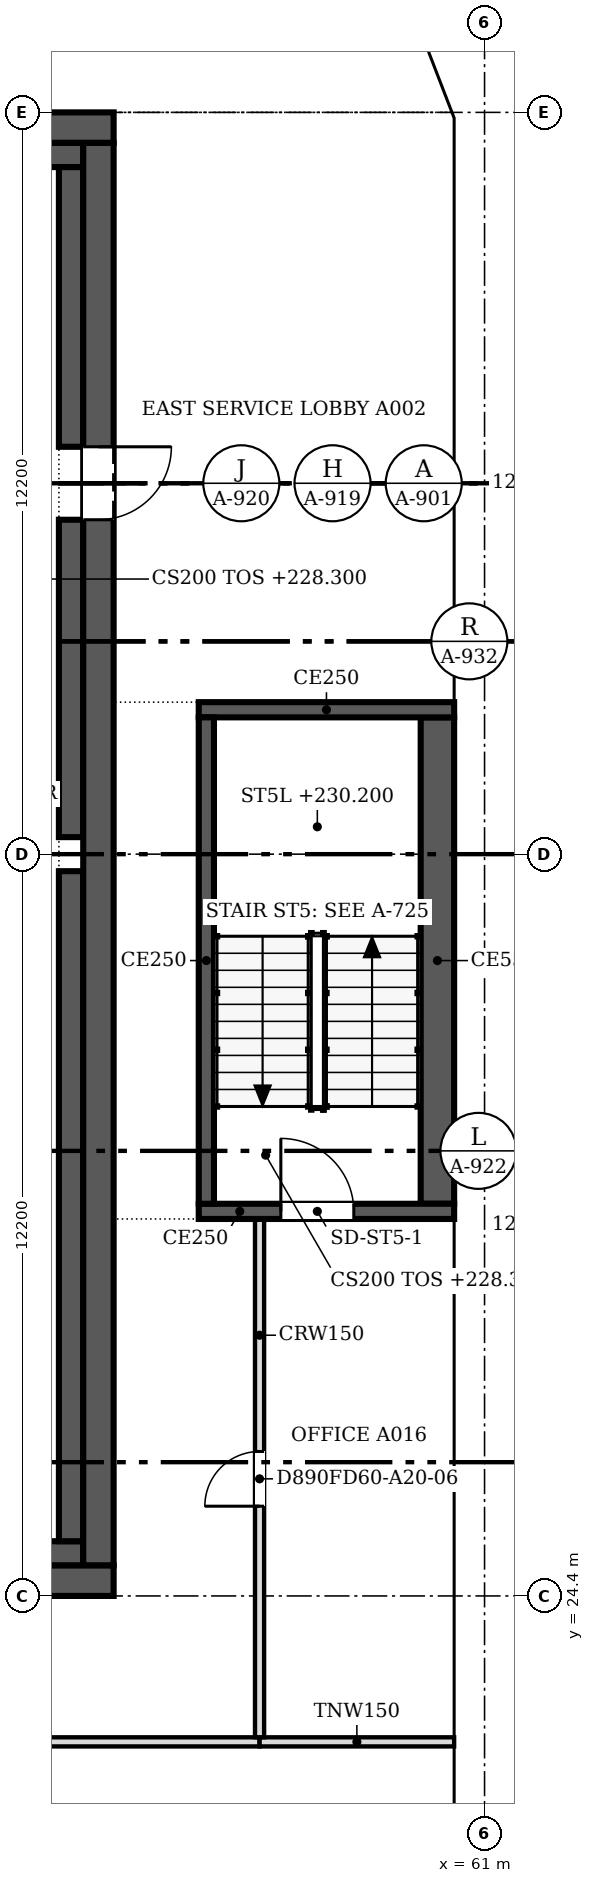
"""IFC4 building model, lengths in metres.
Left out: names, types, materials, properties, quantities, classifications, styles, units other than length and angle.
Written with IfcOpenShell. Run it as: python <this file> out.ifc"""

import sys

from ifc_helpers import new_model, si_unit, direction, frame, frame_2d, origin, place, context, subcontext, project, spatial, polyline, rectangle, outline, extrude, faceted_brep, source, transform, mapped, element, fill, save


model = new_model("IFC4")
c1 = context("Model", 3, precision=1e-05, world=origin(), true_north=direction((0.0, 1.0)))
c2 = subcontext(c1, "Body", "Model", "MODEL_VIEW")
j1 = project(units=[si_unit("LENGTHUNIT", "METRE"), si_unit("PLANEANGLEUNIT", "RADIAN")], contexts=[c1])
p1 = place(None, origin())
s1 = spatial("IfcSite", under=j1, at=p1, CompositionType="ELEMENT")
p2 = place(p1, origin())
s2 = spatial("IfcBuilding", under=s1, at=p2, CompositionType="ELEMENT")
p3 = place(p2, frame((0.0, 0.0, 228.3)))
s3 = spatial("IfcBuildingStorey", under=s2, at=p3, CompositionType="ELEMENT", Elevation=228.3)
m1 = source(origin(), c2, "Body", "Brep", [
    faceted_brep([(3.05, -0.25, 0.0), (6.1, -0.25, 3.8), (6.1, -0.25, 3.8), (3.05, -0.25, 7.6), (0.0, -0.25, 3.8), (0.0, 0.25, 3.8), (3.05, 0.25, 7.6), (6.1, 0.25, 3.8), (6.1, 0.25, 3.8), (3.05, 0.25, 0.0)], [[[0, 1, 2, 3, 4]], [[5, 6, 7, 8, 9]], [[9, 8, 1, 0]], [[7, 6, 3, 2]], [[6, 5, 4, 3]], [[5, 9, 0, 4]], [[1, 8, 7, 2]]]),
])
p4 = place(p3, frame((60.75, 18.3, -3.8), z_axis=(0.0, 0.0, 1.0), x_axis=(0.0, 1.0, 0.0)))
e1 = element("IfcWall", 1, at=p4, inside=s3, PredefinedType="SOLIDWALL", context=c2, shape_type="MappedRepresentation", body=[
    mapped(m1, transform((0.0, 0.0, 0.0), scale=1.0)),
])
m2 = source(origin(), c2, "Body", "SweptSolid", [
    extrude(outline(polyline([(3.05, 0.399), (5.78, 3.8), (3.05, 7.201), (0.321, 3.8), (3.05, 0.399)])), frame((0.0, 0.26, 0.0), z_axis=(0.0, -1.0, 0.0), x_axis=(1.0, 0.0, 0.0)), (0.0, 0.0, 1.0), 0.52),
])
p5 = place(p4, origin())
e2 = element("IfcOpeningElement", 2, at=p5, cuts=e1, PredefinedType="OPENING", context=c2, shape_type="MappedRepresentation", body=[
    mapped(m2, transform((0.0, 0.0, 0.0), scale=1.0)),
])
m3 = source(origin(), c2, "Body", "SweptSolid", [
    extrude(outline(polyline([(3.05, 0.0), (6.1, 3.8), (3.05, 7.6), (0.0, 3.8), (3.05, 0.0)])), frame((0.0, 0.25, 0.0), z_axis=(0.0, -1.0, 0.0), x_axis=(1.0, 0.0, 0.0)), (0.0, 0.0, 1.0), 0.5),
])
p6 = place(p3, frame((60.75, 24.4, -3.8), z_axis=(0.0, 0.0, 1.0), x_axis=(0.0, 1.0, 0.0)))
e3 = element("IfcWall", 3, at=p6, inside=s3, PredefinedType="SOLIDWALL", context=c2, shape_type="MappedRepresentation", body=[
    mapped(m3, transform((0.0, 0.0, 0.0), scale=1.0)),
])
p7 = place(p6, origin())
e4 = element("IfcOpeningElement", 4, at=p7, cuts=e3, PredefinedType="OPENING", context=c2, shape_type="MappedRepresentation", body=[
    mapped(m2, transform((0.0, 0.0, 0.0), scale=1.0)),
])
p8 = place(p3, frame((60.75, 30.5, -3.8), z_axis=(0.0, 0.0, 1.0), x_axis=(0.0, 1.0, 0.0)))
e5 = element("IfcWall", 5, at=p8, inside=s3, PredefinedType="SOLIDWALL", context=c2, shape_type="MappedRepresentation", body=[
    mapped(m3, transform((0.0, 0.0, 0.0), scale=1.0)),
])
p9 = place(p8, origin())
e6 = element("IfcOpeningElement", 6, at=p9, cuts=e5, PredefinedType="OPENING", context=c2, shape_type="MappedRepresentation", body=[
    mapped(m2, transform((0.0, 0.0, 0.0), scale=1.0)),
])
p10 = place(p3, frame((60.75, 36.6, -3.8), z_axis=(0.0, 0.0, 1.0), x_axis=(0.0, 1.0, 0.0)))
e7 = element("IfcWall", 7, at=p10, inside=s3, PredefinedType="SOLIDWALL", context=c2, shape_type="MappedRepresentation", body=[
    mapped(m1, transform((0.0, 0.0, 0.0), scale=1.0)),
])
p11 = place(p10, origin())
e8 = element("IfcOpeningElement", 8, at=p11, cuts=e7, PredefinedType="OPENING", context=c2, shape_type="MappedRepresentation", body=[
    mapped(m2, transform((0.0, 0.0, 0.0), scale=1.0)),
])
m4 = source(origin(), c2, "Body", "Brep", [
    faceted_brep([(3.05, -0.25, 0.0), (6.053, -0.25, 3.8), (3.05, -0.25, 7.6), (0.0, -0.25, 3.8), (0.0, 0.25, 3.8), (3.05, 0.25, 7.6), (6.007, 0.25, 3.859), (6.007, 0.25, 3.741), (3.05, 0.25, 0.0), (6.053, 0.0, 3.8)], [[[0, 1, 2, 3]], [[4, 5, 6, 7, 8]], [[8, 7, 9, 1, 0]], [[6, 5, 2, 1, 9]], [[5, 4, 3, 2]], [[4, 8, 0, 3]], [[9, 7, 6]]]),
])
p12 = place(p3, frame((60.75, 42.7, -3.8), z_axis=(0.0, 0.0, 1.0), x_axis=(0.0, 1.0, 0.0)))
e9 = element("IfcWall", 9, at=p12, inside=s3, PredefinedType="SOLIDWALL", context=c2, shape_type="MappedRepresentation", body=[
    mapped(m4, transform((0.0, 0.0, 0.0), scale=1.0)),
])
m5 = source(origin(), c2, "Body", "SweptSolid", [
    extrude(outline(polyline([(3.049, 0.401), (5.735, 3.8), (3.049, 7.199), (0.321, 3.8), (3.049, 0.401)])), frame((0.0, 0.26, 0.0), z_axis=(0.0, -1.0, 0.0), x_axis=(1.0, 0.0, 0.0)), (0.0, 0.0, 1.0), 0.52),
])
p13 = place(p12, origin())
e10 = element("IfcOpeningElement", 10, at=p13, cuts=e9, PredefinedType="OPENING", context=c2, shape_type="MappedRepresentation", body=[
    mapped(m5, transform((0.0, 0.0, 0.0), scale=1.0)),
])
m6 = source(origin(), c2, "Body", "Brep", [
    faceted_brep([(2.95, -0.25, 0.0), (3.003, -0.25, 0.068), (3.003, -0.25, 7.532), (2.95, -0.25, 7.6), (0.0, -0.25, 3.8), (0.047, 0.25, 3.86), (2.898, 0.25, 7.532), (2.898, 0.25, 0.068), (0.047, 0.25, 3.74), (2.95, 0.0, 0.0), (2.95, 0.0, 7.6), (0.0, 0.0, 3.8)], [[[0, 1, 2, 3, 4]], [[5, 6, 7, 8]], [[1, 0, 9]], [[10, 3, 2]], [[6, 5, 11, 4, 3, 10]], [[8, 7, 9, 0, 4, 11]], [[8, 11, 5]], [[1, 9, 7, 6, 10, 2]]]),
])
p14 = place(p3, frame((60.75, 48.753, -3.8), z_axis=(0.0, 0.0, 1.0), x_axis=(-0.35992665181, 0.932980602862, 0.0)))
e11 = element("IfcWall", 11, at=p14, inside=s3, PredefinedType="SOLIDWALL", context=c2, shape_type="MappedRepresentation", body=[
    mapped(m6, transform((0.0, 0.0, 0.0), scale=1.0)),
])
m7 = source(origin(), c2, "Body", "SweptSolid", [
    extrude(outline(polyline([(2.75, 6.935), (0.316, 3.8), (2.75, 0.665), (2.75, 6.935)])), frame((0.0, 0.26, 0.0), z_axis=(0.0, -1.0, 0.0), x_axis=(1.0, 0.0, 0.0)), (0.0, 0.0, 1.0), 0.52),
])
p15 = place(p14, origin())
e12 = element("IfcOpeningElement", 12, at=p15, cuts=e11, PredefinedType="OPENING", context=c2, shape_type="MappedRepresentation", body=[
    mapped(m7, transform((0.0, 0.0, 0.0), scale=1.0)),
])
m8 = source(origin(), c2, "Body", "SweptSolid", [
    extrude(outline(polyline([(3.05, 0.0), (6.1, 3.8), (0.0, 3.8), (3.05, 0.0)])), frame((0.0, 0.25, 0.0), z_axis=(0.0, -1.0, 0.0), x_axis=(1.0, 0.0, 0.0)), (0.0, 0.0, 1.0), 0.5),
])
p16 = place(p3, frame((60.75, 15.25, 0.0), z_axis=(0.0, 0.0, 1.0), x_axis=(0.0, 1.0, 0.0)))
e13 = element("IfcWall", 13, at=p16, inside=s3, PredefinedType="SOLIDWALL", context=c2, shape_type="MappedRepresentation", body=[
    mapped(m8, transform((0.0, 0.0, 0.0), scale=1.0)),
])
m9 = source(origin(), c2, "Body", "SweptSolid", [
    extrude(outline(polyline([(3.05, 0.399), (5.579, 3.55), (0.521, 3.55), (3.05, 0.399)])), frame((0.0, 0.26, 0.0), z_axis=(0.0, -1.0, 0.0), x_axis=(1.0, 0.0, 0.0)), (0.0, 0.0, 1.0), 0.52),
])
p17 = place(p16, origin())
e14 = element("IfcOpeningElement", 14, at=p17, cuts=e13, PredefinedType="OPENING", context=c2, shape_type="MappedRepresentation", body=[
    mapped(m9, transform((0.0, 0.0, 0.0), scale=1.0)),
])
m10 = source(origin(), c2, "Body", "Brep", [
    faceted_brep([(3.05, -0.25, 0.0), (6.1, -0.25, 3.8), (6.1, -0.25, 3.8), (0.0, -0.25, 3.8), (0.0, 0.25, 3.8), (6.1, 0.25, 3.8), (6.1, 0.25, 3.8), (3.05, 0.25, 0.0)], [[[0, 1, 2, 3]], [[4, 5, 6, 7]], [[7, 6, 1, 0]], [[5, 4, 3, 2]], [[4, 7, 0, 3]], [[1, 6, 5, 2]]]),
])
p18 = place(p3, frame((60.75, 21.35, 0.0), z_axis=(0.0, 0.0, 1.0), x_axis=(0.0, 1.0, 0.0)))
e15 = element("IfcWall", 15, at=p18, inside=s3, PredefinedType="SOLIDWALL", context=c2, shape_type="MappedRepresentation", body=[
    mapped(m10, transform((0.0, 0.0, 0.0), scale=1.0)),
])
p19 = place(p18, origin())
e16 = element("IfcOpeningElement", 16, at=p19, cuts=e15, PredefinedType="OPENING", context=c2, shape_type="MappedRepresentation", body=[
    mapped(m9, transform((0.0, 0.0, 0.0), scale=1.0)),
])
p20 = place(p3, frame((60.75, 27.45, 0.0), z_axis=(0.0, 0.0, 1.0), x_axis=(0.0, 1.0, 0.0)))
e17 = element("IfcWall", 17, at=p20, inside=s3, PredefinedType="SOLIDWALL", context=c2, shape_type="MappedRepresentation", body=[
    mapped(m8, transform((0.0, 0.0, 0.0), scale=1.0)),
])
p21 = place(p20, origin())
e18 = element("IfcOpeningElement", 18, at=p21, cuts=e17, PredefinedType="OPENING", context=c2, shape_type="MappedRepresentation", body=[
    mapped(m9, transform((0.0, 0.0, 0.0), scale=1.0)),
])
p22 = place(p3, frame((60.75, 33.55, 0.0), z_axis=(0.0, 0.0, 1.0), x_axis=(0.0, 1.0, 0.0)))
e19 = element("IfcWall", 19, at=p22, inside=s3, PredefinedType="SOLIDWALL", context=c2, shape_type="MappedRepresentation", body=[
    mapped(m10, transform((0.0, 0.0, 0.0), scale=1.0)),
])
p23 = place(p22, origin())
e20 = element("IfcOpeningElement", 20, at=p23, cuts=e19, PredefinedType="OPENING", context=c2, shape_type="MappedRepresentation", body=[
    mapped(m9, transform((0.0, 0.0, 0.0), scale=1.0)),
])
p24 = place(p3, frame((60.75, 39.65, 0.0), z_axis=(0.0, 0.0, 1.0), x_axis=(0.0, 1.0, 0.0)))
e21 = element("IfcWall", 21, at=p24, inside=s3, PredefinedType="SOLIDWALL", context=c2, shape_type="MappedRepresentation", body=[
    mapped(m8, transform((0.0, 0.0, 0.0), scale=1.0)),
])
p25 = place(p24, origin())
e22 = element("IfcOpeningElement", 22, at=p25, cuts=e21, PredefinedType="OPENING", context=c2, shape_type="MappedRepresentation", body=[
    mapped(m9, transform((0.0, 0.0, 0.0), scale=1.0)),
])
m11 = source(origin(), c2, "Body", "Brep", [
    faceted_brep([(3.003, -0.25, 0.0), (3.05, -0.25, 0.06), (3.05, -0.25, 3.8), (0.0, -0.25, 3.8), (0.0, 0.25, 3.8), (2.957, 0.25, 3.8), (2.957, 0.25, 0.059), (3.003, 0.0, 0.0)], [[[0, 1, 2, 3]], [[4, 5, 6]], [[1, 0, 7]], [[5, 4, 3, 2]], [[4, 6, 7, 0, 3]], [[1, 7, 6, 5, 2]]]),
])
p26 = place(p3, frame((60.75, 45.75, 0.0), z_axis=(0.0, 0.0, 1.0), x_axis=(0.0, 1.0, 0.0)))
e23 = element("IfcWall", 23, at=p26, inside=s3, PredefinedType="SOLIDWALL", context=c2, shape_type="MappedRepresentation", body=[
    mapped(m11, transform((0.0, 0.0, 0.0), scale=1.0)),
])
m12 = source(origin(), c2, "Body", "SweptSolid", [
    extrude(outline(polyline([(2.803, 3.55), (0.516, 3.55), (2.803, 0.656), (2.803, 3.55)])), frame((0.0, 0.26, 0.0), z_axis=(0.0, -1.0, 0.0), x_axis=(1.0, 0.0, 0.0)), (0.0, 0.0, 1.0), 0.52),
])
p27 = place(p26, origin())
e24 = element("IfcOpeningElement", 24, at=p27, cuts=e23, PredefinedType="OPENING", context=c2, shape_type="MappedRepresentation", body=[
    mapped(m12, transform((0.0, 0.0, 0.0), scale=1.0)),
])
m13 = source(origin(), c2, "Body", "Brep", [
    faceted_brep([(0.047, -0.25, 0.0), (2.997, -0.25, 3.8), (0.0, -0.25, 3.8), (0.0, -0.25, 0.059), (0.093, 0.25, 3.8), (2.944, 0.25, 3.8), (2.944, 0.25, 3.732), (0.093, 0.25, 0.06), (2.997, 0.0, 3.8), (0.047, 0.0, 0.0)], [[[0, 1, 2, 3]], [[4, 5, 6, 7]], [[7, 6, 8, 1, 0, 9]], [[5, 4, 2, 1, 8]], [[9, 0, 3]], [[7, 9, 3, 2, 4]], [[6, 5, 8]]]),
])
p28 = place(p3, frame((60.767, 48.71, 0.0), z_axis=(0.0, 0.0, 1.0), x_axis=(-0.359901446078, 0.932990326376, 0.0)))
e25 = element("IfcWall", 25, at=p28, inside=s3, PredefinedType="SOLIDWALL", context=c2, shape_type="MappedRepresentation", body=[
    mapped(m13, transform((0.0, 0.0, 0.0), scale=1.0)),
])
m14 = source(origin(), c2, "Body", "SweptSolid", [
    extrude(outline(polyline([(0.247, 0.665), (2.487, 3.55), (0.247, 3.55), (0.247, 0.665)])), frame((0.0, 0.26, 0.0), z_axis=(0.0, -1.0, 0.0), x_axis=(1.0, 0.0, 0.0)), (0.0, 0.0, 1.0), 0.52),
])
p29 = place(p28, origin())
e26 = element("IfcOpeningElement", 26, at=p29, cuts=e25, PredefinedType="OPENING", context=c2, shape_type="MappedRepresentation", body=[
    mapped(m14, transform((0.0, 0.0, 0.0), scale=1.0)),
])
p30 = place(p3, frame((54.9, 24.65, 0.0), z_axis=(0.0, 0.0, 1.0), x_axis=(-1.0, 0.0, 0.0)))
e27 = element("IfcWall", 27, at=p30, inside=s3, PredefinedType="SHEAR", context=c2, shape_type="SweptSolid", body=[
    extrude(rectangle(XDim=24.4, YDim=0.5, at=frame_2d((12.2, 0.0))), origin(), (0.0, 0.0, 1.0), 3.8),
])
m15 = source(origin(), c2, "Body", "SweptSolid", [
    extrude(rectangle(XDim=1.2, YDim=2.1, at=frame_2d((0.6, 1.05))), frame((0.0, 0.26, 0.0), z_axis=(0.0, -1.0, 0.0), x_axis=(1.0, 0.0, 0.0)), (0.0, 0.0, 1.0), 0.52),
])
p31 = place(p30, frame((1.5, 0.0, 0.0)))
e28 = element("IfcOpeningElement", 28, at=p31, cuts=e27, PredefinedType="OPENING", context=c2, shape_type="MappedRepresentation", body=[
    mapped(m15, transform((0.0, 0.0, 0.0), scale=1.0)),
])
p32 = place(p3, frame((30.5, 48.55, 0.0), z_axis=(0.0, 0.0, 1.0), x_axis=(1.0, 0.0, 0.0)))
e29 = element("IfcWall", 29, at=p32, inside=s3, PredefinedType="SHEAR", context=c2, shape_type="SweptSolid", body=[
    extrude(rectangle(XDim=24.4, YDim=0.5, at=frame_2d((12.2, 0.0))), origin(), (0.0, 0.0, 1.0), 3.8),
])
p33 = place(p3, frame((54.65, 48.3, 0.0), z_axis=(0.0, 0.0, 1.0), x_axis=(0.0, -1.0, 0.0)))
e30 = element("IfcWall", 30, at=p33, inside=s3, PredefinedType="SHEAR", context=c2, shape_type="SweptSolid", body=[
    extrude(rectangle(XDim=23.4, YDim=0.5, at=frame_2d((11.7, 0.0))), origin(), (0.0, 0.0, 1.0), 3.8),
])
p34 = place(p33, frame((5.0, 0.0, 0.0)))
e31 = element("IfcOpeningElement", 31, at=p34, cuts=e30, PredefinedType="OPENING", context=c2, shape_type="MappedRepresentation", body=[
    mapped(m15, transform((0.0, 0.0, 0.0), scale=1.0)),
])
p35 = place(p3, frame((53.4, 25.1, 0.0), z_axis=(0.0, 0.0, 1.0), x_axis=(1.0, 0.0, 0.0)))
e32 = element("IfcWall", 32, at=p35, inside=s3, PredefinedType="SOLIDWALL", context=c2, shape_type="SweptSolid", body=[
    extrude(rectangle(XDim=1.0, YDim=0.4, at=frame_2d((0.5, 0.0))), origin(), (0.0, 0.0, 1.0), 3.8),
])
p36 = place(p3, frame((31.0, 48.1, 0.0), z_axis=(0.0, 0.0, 1.0), x_axis=(1.0, 0.0, 0.0)))
e33 = element("IfcWall", 33, at=p36, inside=s3, PredefinedType="SOLIDWALL", context=c2, shape_type="SweptSolid", body=[
    extrude(rectangle(XDim=23.4, YDim=0.4, at=frame_2d((11.7, 0.0))), origin(), (0.0, 0.0, 1.0), 3.8),
])
p37 = place(p3, frame((54.2, 25.3, 0.0), z_axis=(0.0, 0.0, 1.0), x_axis=(0.0, 1.0, 0.0)))
e34 = element("IfcWall", 34, at=p37, inside=s3, PredefinedType="SOLIDWALL", context=c2, shape_type="SweptSolid", body=[
    extrude(rectangle(XDim=11.02, YDim=0.4, at=frame_2d((5.51, 0.0))), origin(), (0.0, 0.0, 1.0), 3.8),
])
p38 = place(p3, frame((54.2, 36.88, 0.0), z_axis=(0.0, 0.0, 1.0), x_axis=(0.0, 1.0, 0.0)))
e35 = element("IfcWall", 35, at=p38, inside=s3, PredefinedType="SOLIDWALL", context=c2, shape_type="SweptSolid", body=[
    extrude(rectangle(XDim=5.22, YDim=0.4, at=frame_2d((2.61, 0.0))), origin(), (0.0, 0.0, 1.0), 3.8),
])
p39 = place(p3, frame((54.2, 43.3, 0.0), z_axis=(0.0, 0.0, 1.0), x_axis=(0.0, 1.0, 0.0)))
e36 = element("IfcWall", 36, at=p39, inside=s3, PredefinedType="SOLIDWALL", context=c2, shape_type="SweptSolid", body=[
    extrude(rectangle(XDim=4.6, YDim=0.4, at=frame_2d((2.3, 0.0))), origin(), (0.0, 0.0, 1.0), 3.8),
])
p40 = place(p3, frame((60.5, 30.725, 0.0), z_axis=(0.0, 0.0, 1.0), x_axis=(-1.0, 0.0, 0.0)))
e37 = element("IfcWall", 37, at=p40, inside=s3, PredefinedType="SOLIDWALL", context=c2, shape_type="SweptSolid", body=[
    extrude(rectangle(XDim=4.2, YDim=0.25, at=frame_2d((2.1, 0.0))), origin(), (0.0, 0.0, 1.0), 3.8),
])
m16 = source(origin(), c2, "Body", "SweptSolid", [
    extrude(rectangle(XDim=1.2, YDim=2.1, at=frame_2d((0.6, 1.05))), frame((0.0, 0.135, 0.0), z_axis=(0.0, -1.0, 0.0), x_axis=(1.0, 0.0, 0.0)), (0.0, 0.0, 1.0), 0.27),
])
p41 = place(p40, frame((1.65, 0.0, 0.0)))
e38 = element("IfcOpeningElement", 38, at=p41, cuts=e37, PredefinedType="OPENING", context=c2, shape_type="MappedRepresentation", body=[
    mapped(m16, transform((0.0, 0.0, 0.0), scale=1.0)),
])
p42 = place(p3, frame((56.425, 30.85, 0.0), z_axis=(0.0, 0.0, 1.0), x_axis=(0.0, 1.0, 0.0)))
e39 = element("IfcWall", 39, at=p42, inside=s3, PredefinedType="SOLIDWALL", context=c2, shape_type="SweptSolid", body=[
    extrude(rectangle(XDim=8.0, YDim=0.25, at=frame_2d((4.0, 0.0))), origin(), (0.0, 0.0, 1.0), 3.8),
])
p43 = place(p3, frame((56.3, 38.975, 0.0), z_axis=(0.0, 0.0, 1.0), x_axis=(1.0, 0.0, 0.0)))
e40 = element("IfcWall", 40, at=p43, inside=s3, PredefinedType="SOLIDWALL", context=c2, shape_type="SweptSolid", body=[
    extrude(rectangle(XDim=4.2, YDim=0.25, at=frame_2d((2.1, 0.0))), origin(), (0.0, 0.0, 1.0), 3.8),
])
p44 = place(p3, frame((60.225, 38.85, 0.0), z_axis=(0.0, 0.0, 1.0), x_axis=(0.0, -1.0, 0.0)))
e41 = element("IfcWall", 41, at=p44, inside=s3, PredefinedType="SOLIDWALL", context=c2, shape_type="SweptSolid", body=[
    extrude(rectangle(XDim=8.0, YDim=0.55, at=frame_2d((4.0, 0.0))), origin(), (0.0, 0.0, 1.0), 3.8),
])
p45 = place(p3, frame((45.4, 22.0, 0.0), z_axis=(0.0, 0.0, 1.0), x_axis=(1.0, 0.0, 0.0)))
e42 = element("IfcWall", 42, at=p45, inside=s3, PredefinedType="PARTITIONING", context=c2, shape_type="SweptSolid", body=[
    extrude(rectangle(XDim=11.9, YDim=0.15, at=frame_2d((5.95, 0.0))), origin(), (0.0, 0.0, 1.0), 2.888),
])
p46 = place(p3, frame((57.301, 22.0, 0.0), z_axis=(0.0, 0.0, 1.0), x_axis=(1.0, 0.0, 0.0)))
e43 = element("IfcWall", 43, at=p46, inside=s3, PredefinedType="PARTITIONING", context=c2, shape_type="SweptSolid", body=[
    extrude(rectangle(XDim=3.199, YDim=0.15, at=frame_2d((1.6, 0.0))), origin(), (0.0, 0.0, 1.0), 2.888),
])
p47 = place(p3, frame((57.3, 30.6, 0.0), z_axis=(0.0, 0.0, 1.0), x_axis=(0.0, -1.0, 0.0)))
e44 = element("IfcWall", 44, at=p47, inside=s3, PredefinedType="PARTITIONING", context=c2, shape_type="SweptSolid", body=[
    extrude(rectangle(XDim=8.524, YDim=0.15, at=frame_2d((4.262, 0.0))), origin(), (0.0, 0.0, 1.0), 2.888),
])
m17 = source(origin(), c2, "Body", "SweptSolid", [
    extrude(rectangle(XDim=0.9, YDim=2.1, at=frame_2d((0.45, 1.05))), frame((0.0, 0.085, 0.0), z_axis=(0.0, -1.0, 0.0), x_axis=(1.0, 0.0, 0.0)), (0.0, 0.0, 1.0), 0.17),
])
p48 = place(p47, frame((3.824, 0.0, 0.0)))
e45 = element("IfcOpeningElement", 45, at=p48, cuts=e44, PredefinedType="OPENING", context=c2, shape_type="MappedRepresentation", body=[
    mapped(m17, transform((0.0, 0.0, 0.0), scale=1.0)),
])
m18 = source(origin(), c2, "Body", "SweptSolid", [
    extrude(rectangle(XDim=1.2, YDim=2.1, at=frame_2d((0.6, 1.05))), frame((0.0, 0.025, 0.0), z_axis=(0.0, -1.0, 0.0), x_axis=(1.0, 0.0, 0.0)), (0.0, 0.0, 1.0), 0.05),
])
p49 = place(p34, origin())
e46 = element("IfcDoor", 46, at=p49, inside=s3, OperationType="SINGLE_SWING_LEFT", PredefinedType="DOOR", context=c2, shape_type="MappedRepresentation", body=[
    mapped(m18, transform((0.0, 0.0, 0.0), scale=1.0)),
])
fill(e31, e46)
p50 = place(p41, origin())
e47 = element("IfcDoor", 47, at=p50, inside=s3, OperationType="SINGLE_SWING_RIGHT", PredefinedType="DOOR", context=c2, shape_type="MappedRepresentation", body=[
    mapped(m18, transform((0.0, 0.0, 0.0), scale=1.0)),
])
fill(e38, e47)
m19 = source(origin(), c2, "Body", "SweptSolid", [
    extrude(rectangle(XDim=0.9, YDim=2.1, at=frame_2d((0.45, 1.05))), frame((0.0, 0.025, 0.0), z_axis=(0.0, -1.0, 0.0), x_axis=(1.0, 0.0, 0.0)), (0.0, 0.0, 1.0), 0.05),
])
p51 = place(p48, origin())
e48 = element("IfcDoor", 48, at=p51, inside=s3, OperationType="SINGLE_SWING_RIGHT", PredefinedType="DOOR", context=c2, shape_type="MappedRepresentation", body=[
    mapped(m19, transform((0.0, 0.0, 0.0), scale=1.0)),
])
fill(e45, e48)
save(model, sys.argv[1])
